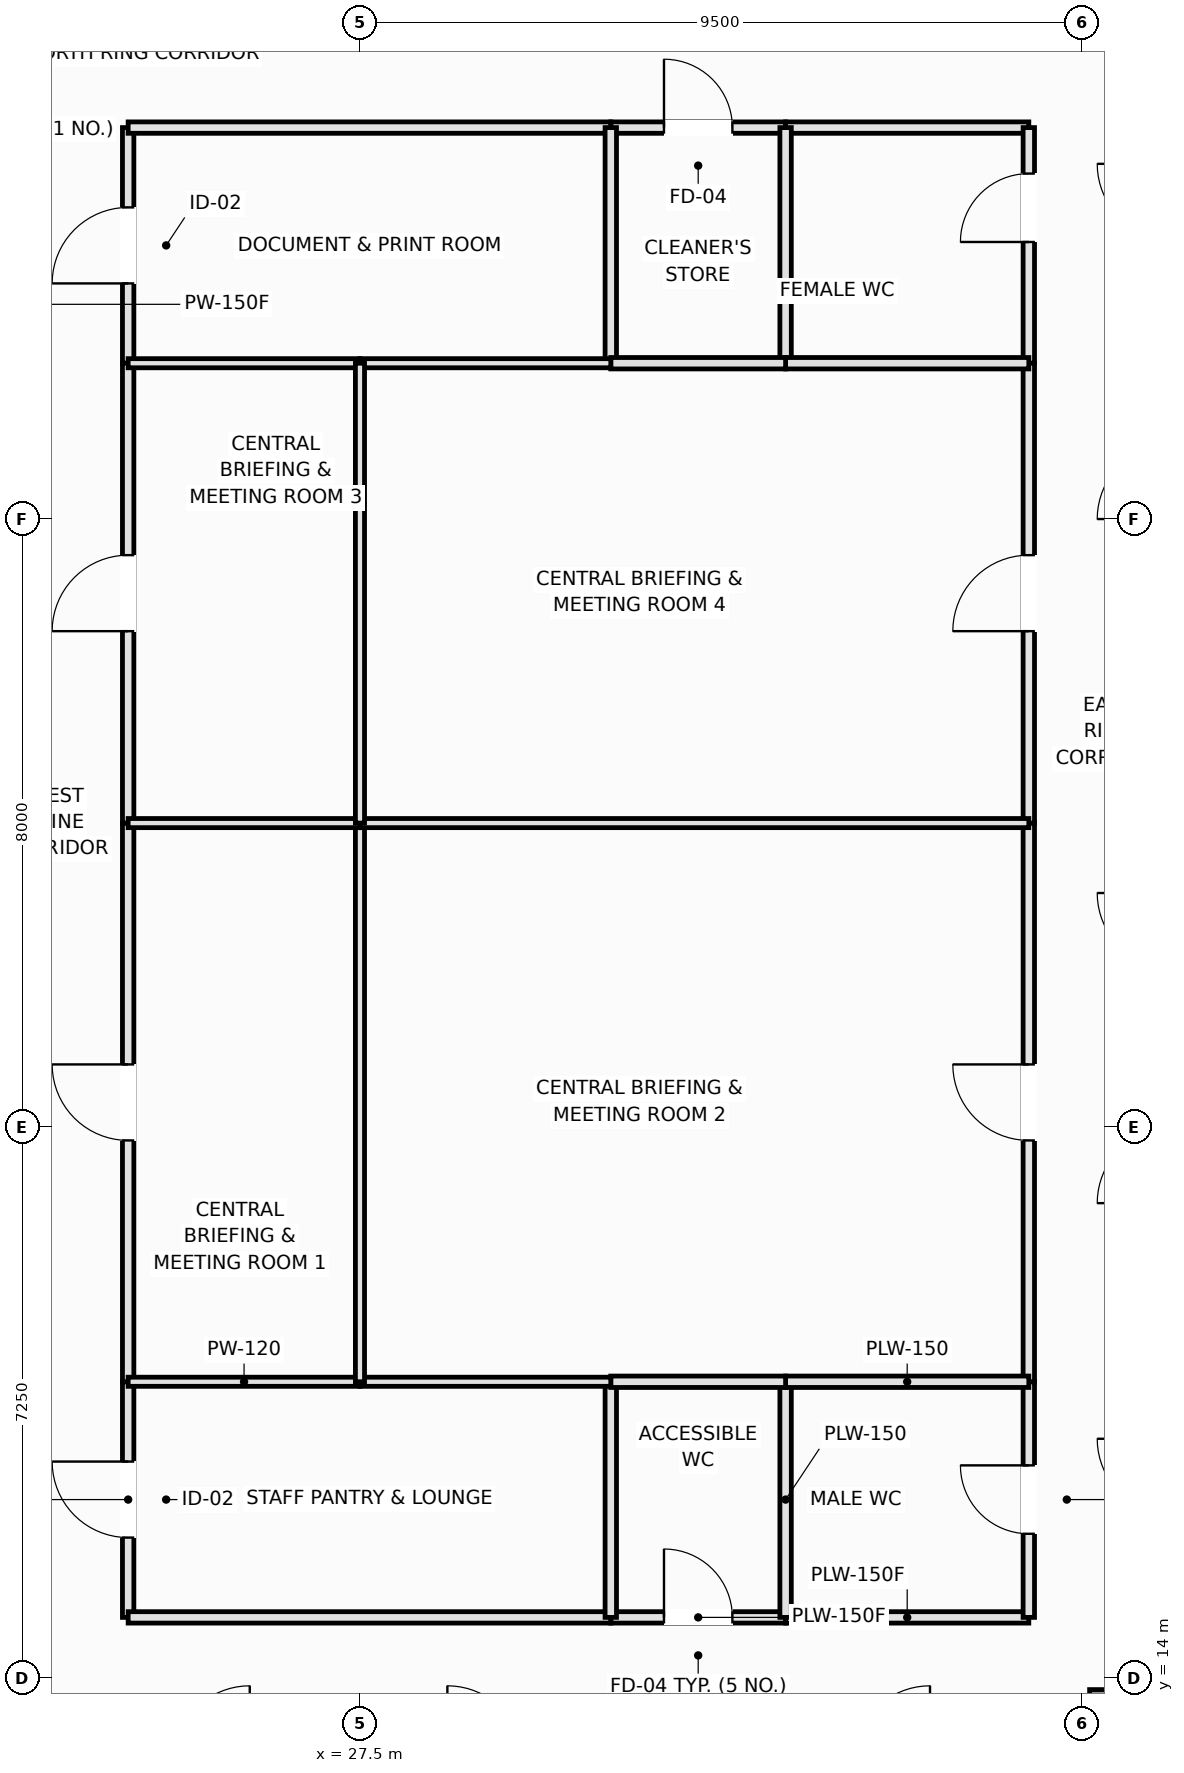
"""IFC4 building model, lengths in metres.
Left out: names, types, materials, properties, quantities, classifications, styles, units other than length and angle.
Written with IfcOpenShell. Run it as: python <this file> out.ifc"""

import sys

from ifc_helpers import new_model, si_unit, direction, frame, frame_2d, origin, origin_2d, place, context, subcontext, project, spatial, rectangle, extrude, element, fill, save


model = new_model("IFC4")
c1 = context("Model", 3, precision=1e-05, world=origin(), true_north=direction((0.0, 1.0)))
c2 = subcontext(c1, "Body", "Model", "MODEL_VIEW")
j1 = project(units=[si_unit("LENGTHUNIT", "METRE"), si_unit("PLANEANGLEUNIT", "RADIAN")], contexts=[c1])
p1 = place(None, origin())
s1 = spatial("IfcSite", under=j1, at=p1, CompositionType="ELEMENT")
p2 = place(p1, origin())
s2 = spatial("IfcBuilding", under=s1, at=p2, CompositionType="ELEMENT")
p3 = place(p2, frame((0.0, 0.0, 78.85)))
s3 = spatial("IfcBuildingStorey", under=s2, at=p3, CompositionType="ELEMENT", Elevation=78.85)
p4 = place(p3, frame((38.2, 12.75, 0.0), z_axis=(0.0, 0.0, 1.0), x_axis=(1.0, 0.0, 0.0)))
e1 = element("IfcColumn", 1, at=p4, inside=s3, PredefinedType="COLUMN", context=c2, shape_type="SweptSolid", body=[
    extrude(rectangle(XDim=2.2, YDim=2.2, at=origin_2d()), origin(), (0.0, 0.0, 1.0), 3.55),
])
p5 = place(p3, frame((24.45, 14.8, 0.0), z_axis=(0.0, 0.0, 1.0), x_axis=(0.0, 1.0, 0.0)))
e2 = element("IfcWall", 2, at=p5, inside=s3, PredefinedType="PARTITIONING", context=c2, shape_type="SweptSolid", body=[
    extrude(rectangle(XDim=3.1, YDim=0.15, at=frame_2d((1.55, 0.0))), origin(), (0.0, 0.0, 1.0), 3.37),
])
p6 = place(p5, frame((1.05, 0.0, 0.0)))
e3 = element("IfcOpeningElement", 3, at=p6, cuts=e2, PredefinedType="OPENING", context=c2, shape_type="SweptSolid", body=[
    extrude(rectangle(XDim=1.0, YDim=2.15, at=frame_2d((0.5, 1.075))), frame((0.0, 0.085, 0.0), z_axis=(0.0, -1.0, 0.0), x_axis=(1.0, 0.0, 0.0)), (0.0, 0.0, 1.0), 0.17),
])
p7 = place(p3, frame((24.45, 31.3, 0.0), z_axis=(0.0, 0.0, 1.0), x_axis=(0.0, 1.0, 0.0)))
e4 = element("IfcWall", 4, at=p7, inside=s3, PredefinedType="PARTITIONING", context=c2, shape_type="SweptSolid", body=[
    extrude(rectangle(XDim=3.1, YDim=0.15, at=frame_2d((1.55, 0.0))), origin(), (0.0, 0.0, 1.0), 3.37),
])
p8 = place(p7, frame((1.05, 0.0, 0.0)))
e5 = element("IfcOpeningElement", 5, at=p8, cuts=e4, PredefinedType="OPENING", context=c2, shape_type="SweptSolid", body=[
    extrude(rectangle(XDim=1.0, YDim=2.15, at=frame_2d((0.5, 1.075))), frame((0.0, 0.085, 0.0), z_axis=(0.0, -1.0, 0.0), x_axis=(1.0, 0.0, 0.0)), (0.0, 0.0, 1.0), 0.17),
])
p9 = place(p3, frame((24.45, 17.9, 0.0), z_axis=(0.0, 0.0, 1.0), x_axis=(0.0, 1.0, 0.0)))
e6 = element("IfcWall", 6, at=p9, inside=s3, PredefinedType="PARTITIONING", context=c2, shape_type="SweptSolid", body=[
    extrude(rectangle(XDim=7.35, YDim=0.15, at=frame_2d((3.675, 0.0))), origin(), (0.0, 0.0, 1.0), 3.37),
])
p10 = place(p9, frame((3.175, 0.0, 0.0)))
e7 = element("IfcOpeningElement", 7, at=p10, cuts=e6, PredefinedType="OPENING", context=c2, shape_type="SweptSolid", body=[
    extrude(rectangle(XDim=1.0, YDim=2.15, at=frame_2d((0.5, 1.075))), frame((0.0, 0.085, 0.0), z_axis=(0.0, -1.0, 0.0), x_axis=(1.0, 0.0, 0.0)), (0.0, 0.0, 1.0), 0.17),
])
p11 = place(p3, frame((24.45, 25.25, 0.0), z_axis=(0.0, 0.0, 1.0), x_axis=(0.0, 1.0, 0.0)))
e8 = element("IfcWall", 8, at=p11, inside=s3, PredefinedType="PARTITIONING", context=c2, shape_type="SweptSolid", body=[
    extrude(rectangle(XDim=6.05, YDim=0.15, at=frame_2d((3.025, 0.0))), origin(), (0.0, 0.0, 1.0), 3.37),
])
p12 = place(p11, frame((2.525, 0.0, 0.0)))
e9 = element("IfcOpeningElement", 9, at=p12, cuts=e8, PredefinedType="OPENING", context=c2, shape_type="SweptSolid", body=[
    extrude(rectangle(XDim=1.0, YDim=2.15, at=frame_2d((0.5, 1.075))), frame((0.0, 0.085, 0.0), z_axis=(0.0, -1.0, 0.0), x_axis=(1.0, 0.0, 0.0)), (0.0, 0.0, 1.0), 0.17),
])
p13 = place(p3, frame((33.1, 14.8, 0.0), z_axis=(0.0, 0.0, 1.0), x_axis=(1.0, 0.0, 0.0)))
e10 = element("IfcWall", 10, at=p13, inside=s3, PredefinedType="PLUMBINGWALL", context=c2, shape_type="SweptSolid", body=[
    extrude(rectangle(XDim=3.2, YDim=0.15, at=frame_2d((1.6, 0.0))), origin(), (0.0, 0.0, 1.0), 3.37),
])
p14 = place(p3, frame((30.8, 14.8, 0.0), z_axis=(0.0, 0.0, 1.0), x_axis=(1.0, 0.0, 0.0)))
e11 = element("IfcWall", 11, at=p14, inside=s3, PredefinedType="PLUMBINGWALL", context=c2, shape_type="SweptSolid", body=[
    extrude(rectangle(XDim=2.3, YDim=0.15, at=frame_2d((1.15, 0.0))), origin(), (0.0, 0.0, 1.0), 3.37),
])
p15 = place(p14, frame((0.7, 0.0, 0.0)))
e12 = element("IfcOpeningElement", 12, at=p15, cuts=e11, PredefinedType="OPENING", context=c2, shape_type="SweptSolid", body=[
    extrude(rectangle(XDim=0.9, YDim=2.1, at=frame_2d((0.45, 1.05))), frame((0.0, 0.085, 0.0), z_axis=(0.0, -1.0, 0.0), x_axis=(1.0, 0.0, 0.0)), (0.0, 0.0, 1.0), 0.17),
])
p16 = place(p3, frame((24.45, 14.8, 0.0), z_axis=(0.0, 0.0, 1.0), x_axis=(1.0, 0.0, 0.0)))
e13 = element("IfcWall", 13, at=p16, inside=s3, PredefinedType="PARTITIONING", context=c2, shape_type="SweptSolid", body=[
    extrude(rectangle(XDim=6.35, YDim=0.15, at=frame_2d((3.175, 0.0))), origin(), (0.0, 0.0, 1.0), 3.37),
])
p17 = place(p3, frame((33.1, 34.4, 0.0), z_axis=(0.0, 0.0, 1.0), x_axis=(1.0, 0.0, 0.0)))
e14 = element("IfcWall", 14, at=p17, inside=s3, PredefinedType="PLUMBINGWALL", context=c2, shape_type="SweptSolid", body=[
    extrude(rectangle(XDim=3.2, YDim=0.15, at=frame_2d((1.6, 0.0))), origin(), (0.0, 0.0, 1.0), 3.37),
])
p18 = place(p3, frame((30.8, 34.4, 0.0), z_axis=(0.0, 0.0, 1.0), x_axis=(1.0, 0.0, 0.0)))
e15 = element("IfcWall", 15, at=p18, inside=s3, PredefinedType="PLUMBINGWALL", context=c2, shape_type="SweptSolid", body=[
    extrude(rectangle(XDim=2.3, YDim=0.15, at=frame_2d((1.15, 0.0))), origin(), (0.0, 0.0, 1.0), 3.37),
])
p19 = place(p18, frame((0.7, 0.0, 0.0)))
e16 = element("IfcOpeningElement", 16, at=p19, cuts=e15, PredefinedType="OPENING", context=c2, shape_type="SweptSolid", body=[
    extrude(rectangle(XDim=0.9, YDim=2.1, at=frame_2d((0.45, 1.05))), frame((0.0, 0.085, 0.0), z_axis=(0.0, -1.0, 0.0), x_axis=(1.0, 0.0, 0.0)), (0.0, 0.0, 1.0), 0.17),
])
p20 = place(p3, frame((24.45, 34.4, 0.0), z_axis=(0.0, 0.0, 1.0), x_axis=(1.0, 0.0, 0.0)))
e17 = element("IfcWall", 17, at=p20, inside=s3, PredefinedType="PARTITIONING", context=c2, shape_type="SweptSolid", body=[
    extrude(rectangle(XDim=6.35, YDim=0.15, at=frame_2d((3.175, 0.0))), origin(), (0.0, 0.0, 1.0), 3.37),
])
p21 = place(p3, frame((36.3, 14.8, 0.0), z_axis=(0.0, 0.0, 1.0), x_axis=(0.0, 1.0, 0.0)))
e18 = element("IfcWall", 18, at=p21, inside=s3, PredefinedType="PLUMBINGWALL", context=c2, shape_type="SweptSolid", body=[
    extrude(rectangle(XDim=3.1, YDim=0.15, at=frame_2d((1.55, 0.0))), origin(), (0.0, 0.0, 1.0), 3.37),
])
p22 = place(p21, frame((1.1, 0.0, 0.0)))
e19 = element("IfcOpeningElement", 19, at=p22, cuts=e18, PredefinedType="OPENING", context=c2, shape_type="SweptSolid", body=[
    extrude(rectangle(XDim=0.9, YDim=2.1, at=frame_2d((0.45, 1.05))), frame((0.0, 0.085, 0.0), z_axis=(0.0, -1.0, 0.0), x_axis=(1.0, 0.0, 0.0)), (0.0, 0.0, 1.0), 0.17),
])
p23 = place(p3, frame((36.3, 31.3, 0.0), z_axis=(0.0, 0.0, 1.0), x_axis=(0.0, 1.0, 0.0)))
e20 = element("IfcWall", 20, at=p23, inside=s3, PredefinedType="PLUMBINGWALL", context=c2, shape_type="SweptSolid", body=[
    extrude(rectangle(XDim=3.1, YDim=0.15, at=frame_2d((1.55, 0.0))), origin(), (0.0, 0.0, 1.0), 3.37),
])
p24 = place(p23, frame((1.595, 0.0, 0.0)))
e21 = element("IfcOpeningElement", 21, at=p24, cuts=e20, PredefinedType="OPENING", context=c2, shape_type="SweptSolid", body=[
    extrude(rectangle(XDim=0.9, YDim=2.1, at=frame_2d((0.45, 1.05))), frame((0.0, 0.085, 0.0), z_axis=(0.0, -1.0, 0.0), x_axis=(1.0, 0.0, 0.0)), (0.0, 0.0, 1.0), 0.17),
])
p25 = place(p3, frame((36.3, 17.9, 0.0), z_axis=(0.0, 0.0, 1.0), x_axis=(0.0, 1.0, 0.0)))
e22 = element("IfcWall", 22, at=p25, inside=s3, PredefinedType="PARTITIONING", context=c2, shape_type="SweptSolid", body=[
    extrude(rectangle(XDim=7.35, YDim=0.15, at=frame_2d((3.675, 0.0))), origin(), (0.0, 0.0, 1.0), 3.37),
])
p26 = place(p25, frame((3.175, 0.0, 0.0)))
e23 = element("IfcOpeningElement", 23, at=p26, cuts=e22, PredefinedType="OPENING", context=c2, shape_type="SweptSolid", body=[
    extrude(rectangle(XDim=1.0, YDim=2.15, at=frame_2d((0.5, 1.075))), frame((0.0, 0.085, 0.0), z_axis=(0.0, -1.0, 0.0), x_axis=(1.0, 0.0, 0.0)), (0.0, 0.0, 1.0), 0.17),
])
p27 = place(p3, frame((36.3, 25.25, 0.0), z_axis=(0.0, 0.0, 1.0), x_axis=(0.0, 1.0, 0.0)))
e24 = element("IfcWall", 24, at=p27, inside=s3, PredefinedType="PARTITIONING", context=c2, shape_type="SweptSolid", body=[
    extrude(rectangle(XDim=6.05, YDim=0.15, at=frame_2d((3.025, 0.0))), origin(), (0.0, 0.0, 1.0), 3.37),
])
p28 = place(p27, frame((2.525, 0.0, 0.0)))
e25 = element("IfcOpeningElement", 25, at=p28, cuts=e24, PredefinedType="OPENING", context=c2, shape_type="SweptSolid", body=[
    extrude(rectangle(XDim=1.0, YDim=2.15, at=frame_2d((0.5, 1.075))), frame((0.0, 0.085, 0.0), z_axis=(0.0, -1.0, 0.0), x_axis=(1.0, 0.0, 0.0)), (0.0, 0.0, 1.0), 0.17),
])
p29 = place(p3, frame((33.1, 14.8, 0.0), z_axis=(0.0, 0.0, 1.0), x_axis=(0.0, 1.0, 0.0)))
e26 = element("IfcWall", 26, at=p29, inside=s3, PredefinedType="PLUMBINGWALL", context=c2, shape_type="SweptSolid", body=[
    extrude(rectangle(XDim=3.1, YDim=0.15, at=frame_2d((1.55, 0.0))), origin(), (0.0, 0.0, 1.0), 3.37),
])
p30 = place(p3, frame((33.1, 17.9, 0.0), z_axis=(0.0, 0.0, 1.0), x_axis=(1.0, 0.0, 0.0)))
e27 = element("IfcWall", 27, at=p30, inside=s3, PredefinedType="PLUMBINGWALL", context=c2, shape_type="SweptSolid", body=[
    extrude(rectangle(XDim=3.2, YDim=0.15, at=frame_2d((1.6, 0.0))), origin(), (0.0, 0.0, 1.0), 3.37),
])
p31 = place(p3, frame((33.1, 31.3, 0.0), z_axis=(0.0, 0.0, 1.0), x_axis=(0.0, 1.0, 0.0)))
e28 = element("IfcWall", 28, at=p31, inside=s3, PredefinedType="PLUMBINGWALL", context=c2, shape_type="SweptSolid", body=[
    extrude(rectangle(XDim=3.1, YDim=0.15, at=frame_2d((1.55, 0.0))), origin(), (0.0, 0.0, 1.0), 3.37),
])
p32 = place(p3, frame((33.1, 31.3, 0.0), z_axis=(0.0, 0.0, 1.0), x_axis=(1.0, 0.0, 0.0)))
e29 = element("IfcWall", 29, at=p32, inside=s3, PredefinedType="PLUMBINGWALL", context=c2, shape_type="SweptSolid", body=[
    extrude(rectangle(XDim=3.2, YDim=0.15, at=frame_2d((1.6, 0.0))), origin(), (0.0, 0.0, 1.0), 3.37),
])
p33 = place(p3, frame((30.8, 14.8, 0.0), z_axis=(0.0, 0.0, 1.0), x_axis=(0.0, 1.0, 0.0)))
e30 = element("IfcWall", 30, at=p33, inside=s3, PredefinedType="PLUMBINGWALL", context=c2, shape_type="SweptSolid", body=[
    extrude(rectangle(XDim=3.1, YDim=0.15, at=frame_2d((1.55, 0.0))), origin(), (0.0, 0.0, 1.0), 3.37),
])
p34 = place(p3, frame((30.8, 17.9, 0.0), z_axis=(0.0, 0.0, 1.0), x_axis=(1.0, 0.0, 0.0)))
e31 = element("IfcWall", 31, at=p34, inside=s3, PredefinedType="PLUMBINGWALL", context=c2, shape_type="SweptSolid", body=[
    extrude(rectangle(XDim=2.3, YDim=0.15, at=frame_2d((1.15, 0.0))), origin(), (0.0, 0.0, 1.0), 3.37),
])
p35 = place(p3, frame((30.8, 31.3, 0.0), z_axis=(0.0, 0.0, 1.0), x_axis=(0.0, 1.0, 0.0)))
e32 = element("IfcWall", 32, at=p35, inside=s3, PredefinedType="PLUMBINGWALL", context=c2, shape_type="SweptSolid", body=[
    extrude(rectangle(XDim=3.1, YDim=0.15, at=frame_2d((1.55, 0.0))), origin(), (0.0, 0.0, 1.0), 3.37),
])
p36 = place(p3, frame((30.8, 31.3, 0.0), z_axis=(0.0, 0.0, 1.0), x_axis=(1.0, 0.0, 0.0)))
e33 = element("IfcWall", 33, at=p36, inside=s3, PredefinedType="PLUMBINGWALL", context=c2, shape_type="SweptSolid", body=[
    extrude(rectangle(XDim=2.3, YDim=0.15, at=frame_2d((1.15, 0.0))), origin(), (0.0, 0.0, 1.0), 3.37),
])
p37 = place(p3, frame((24.45, 17.9, 0.0), z_axis=(0.0, 0.0, 1.0), x_axis=(1.0, 0.0, 0.0)))
e34 = element("IfcWall", 34, at=p37, inside=s3, PredefinedType="PARTITIONING", context=c2, shape_type="SweptSolid", body=[
    extrude(rectangle(XDim=3.05, YDim=0.12, at=frame_2d((1.525, 0.0))), origin(), (0.0, 0.0, 1.0), 3.37),
])
p38 = place(p3, frame((27.5, 17.9, 0.0), z_axis=(0.0, 0.0, 1.0), x_axis=(1.0, 0.0, 0.0)))
e35 = element("IfcWall", 35, at=p38, inside=s3, PredefinedType="PARTITIONING", context=c2, shape_type="SweptSolid", body=[
    extrude(rectangle(XDim=3.3, YDim=0.12, at=frame_2d((1.65, 0.0))), origin(), (0.0, 0.0, 1.0), 3.37),
])
p39 = place(p3, frame((24.45, 31.3, 0.0), z_axis=(0.0, 0.0, 1.0), x_axis=(1.0, 0.0, 0.0)))
e36 = element("IfcWall", 36, at=p39, inside=s3, PredefinedType="PARTITIONING", context=c2, shape_type="SweptSolid", body=[
    extrude(rectangle(XDim=3.05, YDim=0.12, at=frame_2d((1.525, 0.0))), origin(), (0.0, 0.0, 1.0), 3.37),
])
p40 = place(p3, frame((27.5, 31.3, 0.0), z_axis=(0.0, 0.0, 1.0), x_axis=(1.0, 0.0, 0.0)))
e37 = element("IfcWall", 37, at=p40, inside=s3, PredefinedType="PARTITIONING", context=c2, shape_type="SweptSolid", body=[
    extrude(rectangle(XDim=3.3, YDim=0.12, at=frame_2d((1.65, 0.0))), origin(), (0.0, 0.0, 1.0), 3.37),
])
p41 = place(p3, frame((27.5, 17.9, 0.0), z_axis=(0.0, 0.0, 1.0), x_axis=(0.0, 1.0, 0.0)))
e38 = element("IfcWall", 38, at=p41, inside=s3, PredefinedType="PARTITIONING", context=c2, shape_type="SweptSolid", body=[
    extrude(rectangle(XDim=7.35, YDim=0.12, at=frame_2d((3.675, 0.0))), origin(), (0.0, 0.0, 1.0), 3.37),
])
p42 = place(p3, frame((24.45, 25.25, 0.0), z_axis=(0.0, 0.0, 1.0), x_axis=(1.0, 0.0, 0.0)))
e39 = element("IfcWall", 39, at=p42, inside=s3, PredefinedType="PARTITIONING", context=c2, shape_type="SweptSolid", body=[
    extrude(rectangle(XDim=3.05, YDim=0.12, at=frame_2d((1.525, 0.0))), origin(), (0.0, 0.0, 1.0), 2.72),
])
p43 = place(p3, frame((27.5, 25.25, 0.0), z_axis=(0.0, 0.0, 1.0), x_axis=(1.0, 0.0, 0.0)))
e40 = element("IfcWall", 40, at=p43, inside=s3, PredefinedType="PARTITIONING", context=c2, shape_type="SweptSolid", body=[
    extrude(rectangle(XDim=8.8, YDim=0.12, at=frame_2d((4.4, 0.0))), origin(), (0.0, 0.0, 1.0), 2.72),
])
p44 = place(p3, frame((27.5, 25.25, 0.0), z_axis=(0.0, 0.0, 1.0), x_axis=(0.0, 1.0, 0.0)))
e41 = element("IfcWall", 41, at=p44, inside=s3, PredefinedType="PARTITIONING", context=c2, shape_type="SweptSolid", body=[
    extrude(rectangle(XDim=6.05, YDim=0.12, at=frame_2d((3.025, 0.0))), origin(), (0.0, 0.0, 1.0), 3.37),
])
p45 = place(p6, origin())
e42 = element("IfcDoor", 42, at=p45, inside=s3, OperationType="SINGLE_SWING_RIGHT", PredefinedType="DOOR", context=c2, shape_type="SweptSolid", body=[
    extrude(rectangle(XDim=1.0, YDim=2.15, at=frame_2d((0.5, 1.075))), frame((0.0, 0.025, 0.0), z_axis=(0.0, -1.0, 0.0), x_axis=(1.0, 0.0, 0.0)), (0.0, 0.0, 1.0), 0.05),
])
fill(e3, e42)
p46 = place(p8, origin())
e43 = element("IfcDoor", 43, at=p46, inside=s3, OperationType="SINGLE_SWING_LEFT", PredefinedType="DOOR", context=c2, shape_type="SweptSolid", body=[
    extrude(rectangle(XDim=1.0, YDim=2.15, at=frame_2d((0.5, 1.075))), frame((0.0, 0.025, 0.0), z_axis=(0.0, -1.0, 0.0), x_axis=(1.0, 0.0, 0.0)), (0.0, 0.0, 1.0), 0.05),
])
fill(e5, e43)
p47 = place(p10, origin())
e44 = element("IfcDoor", 44, at=p47, inside=s3, OperationType="SINGLE_SWING_RIGHT", PredefinedType="DOOR", context=c2, shape_type="SweptSolid", body=[
    extrude(rectangle(XDim=1.0, YDim=2.15, at=frame_2d((0.5, 1.075))), frame((0.0, 0.025, 0.0), z_axis=(0.0, -1.0, 0.0), x_axis=(1.0, 0.0, 0.0)), (0.0, 0.0, 1.0), 0.05),
])
fill(e7, e44)
p48 = place(p12, origin())
e45 = element("IfcDoor", 45, at=p48, inside=s3, OperationType="SINGLE_SWING_LEFT", PredefinedType="DOOR", context=c2, shape_type="SweptSolid", body=[
    extrude(rectangle(XDim=1.0, YDim=2.15, at=frame_2d((0.5, 1.075))), frame((0.0, 0.025, 0.0), z_axis=(0.0, -1.0, 0.0), x_axis=(1.0, 0.0, 0.0)), (0.0, 0.0, 1.0), 0.05),
])
fill(e9, e45)
p49 = place(p15, origin())
e46 = element("IfcDoor", 46, at=p49, inside=s3, OperationType="SINGLE_SWING_LEFT", PredefinedType="DOOR", context=c2, shape_type="SweptSolid", body=[
    extrude(rectangle(XDim=0.9, YDim=2.1, at=frame_2d((0.45, 1.05))), frame((0.0, 0.025, 0.0), z_axis=(0.0, -1.0, 0.0), x_axis=(1.0, 0.0, 0.0)), (0.0, 0.0, 1.0), 0.05),
])
fill(e12, e46)
p50 = place(p19, origin())
e47 = element("IfcDoor", 47, at=p50, inside=s3, OperationType="SINGLE_SWING_LEFT", PredefinedType="DOOR", context=c2, shape_type="SweptSolid", body=[
    extrude(rectangle(XDim=0.9, YDim=2.1, at=frame_2d((0.45, 1.05))), frame((0.0, 0.025, 0.0), z_axis=(0.0, -1.0, 0.0), x_axis=(1.0, 0.0, 0.0)), (0.0, 0.0, 1.0), 0.05),
])
fill(e16, e47)
p51 = place(p22, origin())
e48 = element("IfcDoor", 48, at=p51, inside=s3, OperationType="SINGLE_SWING_RIGHT", PredefinedType="DOOR", context=c2, shape_type="SweptSolid", body=[
    extrude(rectangle(XDim=0.9, YDim=2.1, at=frame_2d((0.45, 1.05))), frame((0.0, 0.025, 0.0), z_axis=(0.0, -1.0, 0.0), x_axis=(1.0, 0.0, 0.0)), (0.0, 0.0, 1.0), 0.05),
])
fill(e19, e48)
p52 = place(p24, origin())
e49 = element("IfcDoor", 49, at=p52, inside=s3, OperationType="SINGLE_SWING_LEFT", PredefinedType="DOOR", context=c2, shape_type="SweptSolid", body=[
    extrude(rectangle(XDim=0.9, YDim=2.1, at=frame_2d((0.45, 1.05))), frame((0.0, 0.025, 0.0), z_axis=(0.0, -1.0, 0.0), x_axis=(1.0, 0.0, 0.0)), (0.0, 0.0, 1.0), 0.05),
])
fill(e21, e49)
p53 = place(p26, origin())
e50 = element("IfcDoor", 50, at=p53, inside=s3, OperationType="SINGLE_SWING_RIGHT", PredefinedType="DOOR", context=c2, shape_type="SweptSolid", body=[
    extrude(rectangle(XDim=1.0, YDim=2.15, at=frame_2d((0.5, 1.075))), frame((0.0, 0.025, 0.0), z_axis=(0.0, -1.0, 0.0), x_axis=(1.0, 0.0, 0.0)), (0.0, 0.0, 1.0), 0.05),
])
fill(e23, e50)
p54 = place(p28, origin())
e51 = element("IfcDoor", 51, at=p54, inside=s3, OperationType="SINGLE_SWING_LEFT", PredefinedType="DOOR", context=c2, shape_type="SweptSolid", body=[
    extrude(rectangle(XDim=1.0, YDim=2.15, at=frame_2d((0.5, 1.075))), frame((0.0, 0.025, 0.0), z_axis=(0.0, -1.0, 0.0), x_axis=(1.0, 0.0, 0.0)), (0.0, 0.0, 1.0), 0.05),
])
fill(e25, e51)
save(model, sys.argv[1])
